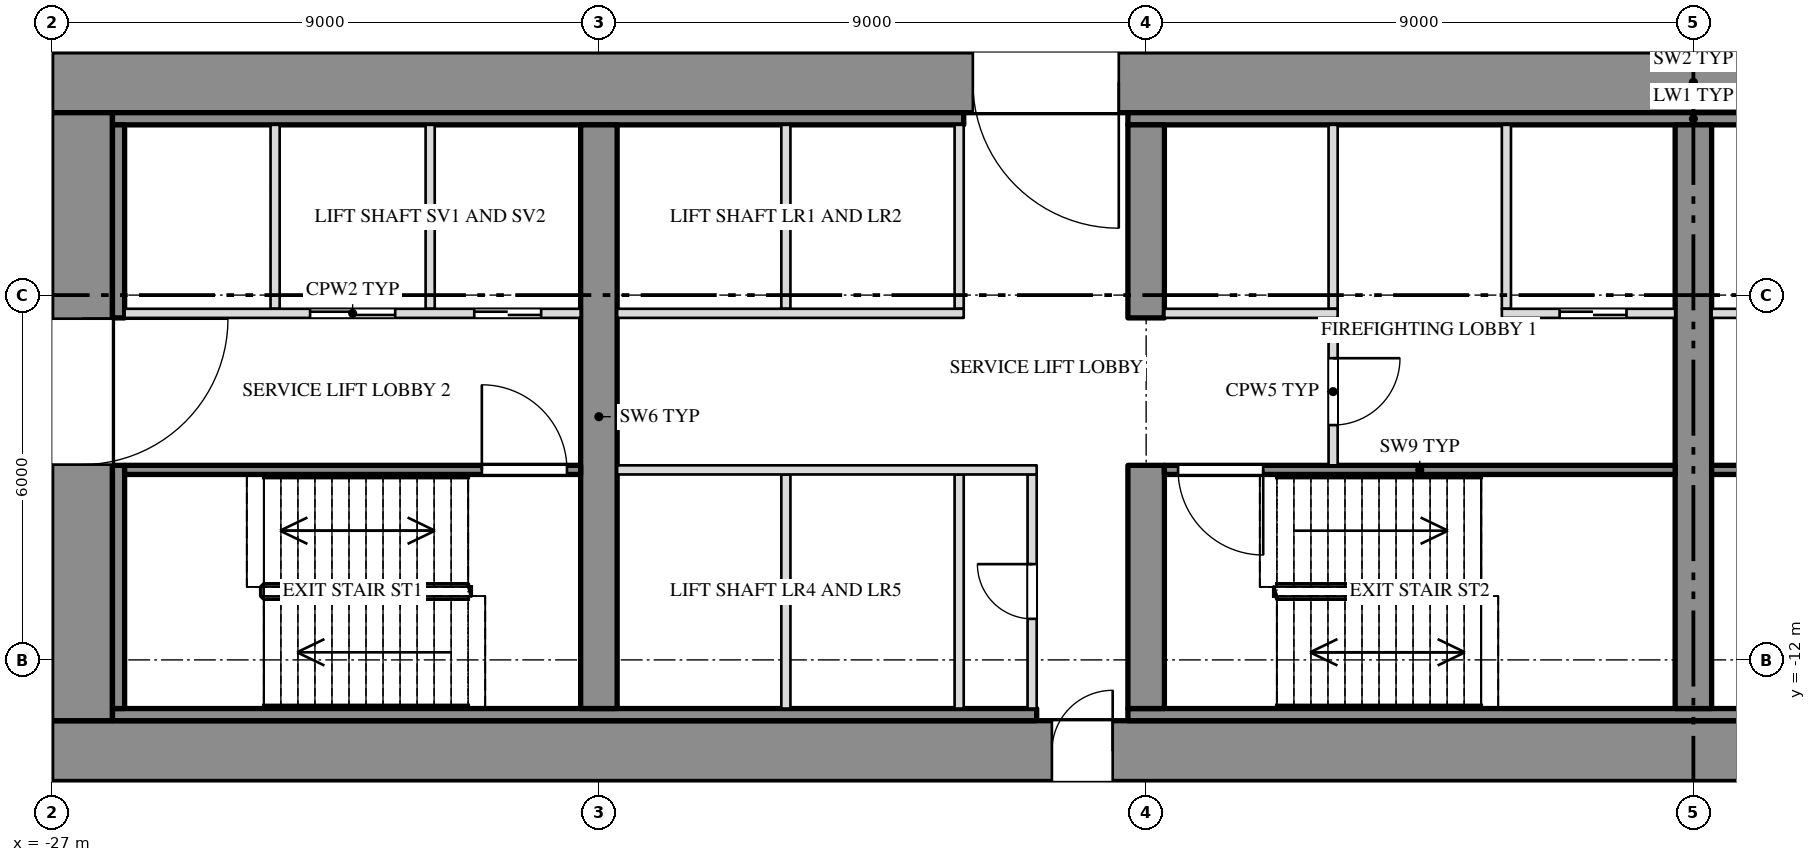
"""IFC4 building model, lengths in metres.
Left out: names, types, materials, properties, quantities, classifications, styles, units other than length and angle.
Written with IfcOpenShell. Run it as: python <this file> out.ifc"""

import sys

from ifc_helpers import new_model, si_unit, direction, frame, frame_2d, origin, place, context, subcontext, project, spatial, rectangle, extrude, element, fill, save


model = new_model("IFC4")
c1 = context("Model", 3, precision=1e-05, world=origin(), true_north=direction((0.0, 1.0)))
c2 = subcontext(c1, "Body", "Model", "MODEL_VIEW")
j1 = project(units=[si_unit("LENGTHUNIT", "METRE"), si_unit("PLANEANGLEUNIT", "RADIAN")], contexts=[c1])
p1 = place(None, origin())
s1 = spatial("IfcSite", under=j1, at=p1, CompositionType="ELEMENT")
p2 = place(p1, origin())
s2 = spatial("IfcBuilding", under=s1, at=p2, CompositionType="ELEMENT")
p3 = place(p2, frame((0.0, 0.0, 104.5)))
s3 = spatial("IfcBuildingStorey", under=s2, at=p3, CompositionType="ELEMENT", Elevation=104.5)
p4 = place(p3, frame((-27.0, -2.5, 0.0), z_axis=(0.0, 0.0, 1.0), x_axis=(1.0, 0.0, 0.0)))
e1 = element("IfcWall", 1, at=p4, inside=s3, PredefinedType="SHEAR", context=c2, shape_type="SweptSolid", body=[
    extrude(rectangle(XDim=54.0, YDim=1.0, at=frame_2d((27.0, 0.0))), origin(), (0.0, 0.0, 1.0), 3.8),
])
p5 = place(p4, frame((15.15, 0.0, 0.0)))
e2 = element("IfcOpeningElement", 2, at=p5, cuts=e1, PredefinedType="OPENING", context=c2, shape_type="SweptSolid", body=[
    extrude(rectangle(XDim=2.4, YDim=2.1, at=frame_2d((1.2, 1.05))), frame((0.0, 0.512, 0.0), z_axis=(0.0, -1.0, 0.0), x_axis=(1.0, 0.0, 0.0)), (0.0, 0.0, 1.0), 1.024),
])
p6 = place(p4, frame((36.45, 0.0, 0.0)))
e3 = element("IfcOpeningElement", 3, at=p6, cuts=e1, PredefinedType="OPENING", context=c2, shape_type="SweptSolid", body=[
    extrude(rectangle(XDim=2.4, YDim=2.1, at=frame_2d((1.2, 1.05))), frame((0.0, 0.512, 0.0), z_axis=(0.0, -1.0, 0.0), x_axis=(1.0, 0.0, 0.0)), (0.0, 0.0, 1.0), 1.024),
])
p7 = place(p3, frame((-27.0, -13.5, 0.0), z_axis=(0.0, 0.0, 1.0), x_axis=(1.0, 0.0, 0.0)))
e4 = element("IfcWall", 4, at=p7, inside=s3, PredefinedType="SHEAR", context=c2, shape_type="SweptSolid", body=[
    extrude(rectangle(XDim=54.0, YDim=1.0, at=frame_2d((27.0, 0.0))), origin(), (0.0, 0.0, 1.0), 3.8),
])
p8 = place(p7, frame((16.45, 0.0, 0.0)))
e5 = element("IfcOpeningElement", 5, at=p8, cuts=e4, PredefinedType="OPENING", context=c2, shape_type="SweptSolid", body=[
    extrude(rectangle(XDim=1.0, YDim=2.1, at=frame_2d((0.5, 1.05))), frame((0.0, 0.512, 0.0), z_axis=(0.0, -1.0, 0.0), x_axis=(1.0, 0.0, 0.0)), (0.0, 0.0, 1.0), 1.024),
])
p9 = place(p7, frame((36.55, 0.0, 0.0)))
e6 = element("IfcOpeningElement", 6, at=p9, cuts=e4, PredefinedType="OPENING", context=c2, shape_type="SweptSolid", body=[
    extrude(rectangle(XDim=1.0, YDim=2.1, at=frame_2d((0.5, 1.05))), frame((0.0, 0.512, 0.0), z_axis=(0.0, -1.0, 0.0), x_axis=(1.0, 0.0, 0.0)), (0.0, 0.0, 1.0), 1.024),
])
p10 = place(p3, frame((-26.5, -13.0, 0.0), z_axis=(0.0, 0.0, 1.0), x_axis=(0.0, 1.0, 0.0)))
e7 = element("IfcWall", 7, at=p10, inside=s3, PredefinedType="SHEAR", context=c2, shape_type="SweptSolid", body=[
    extrude(rectangle(XDim=10.0, YDim=1.0, at=frame_2d((5.0, 0.0))), origin(), (0.0, 0.0, 1.0), 3.8),
])
p11 = place(p10, frame((4.212, 0.0, 0.0)))
e8 = element("IfcOpeningElement", 8, at=p11, cuts=e7, PredefinedType="OPENING", context=c2, shape_type="SweptSolid", body=[
    extrude(rectangle(XDim=2.4, YDim=2.1, at=frame_2d((1.2, 1.05))), frame((0.0, 0.512, 0.0), z_axis=(0.0, -1.0, 0.0), x_axis=(1.0, 0.0, 0.0)), (0.0, 0.0, 1.0), 1.024),
])
p12 = place(p3, frame((-26.0, -3.1, 0.0), z_axis=(0.0, 0.0, 1.0), x_axis=(1.0, 0.0, 0.0)))
e9 = element("IfcWall", 9, at=p12, inside=s3, PredefinedType="SHEAR", context=c2, shape_type="SweptSolid", body=[
    extrude(rectangle(XDim=14.0, YDim=0.2, at=frame_2d((7.0, 0.0))), origin(), (0.0, 0.0, 1.0), 3.8),
])
p13 = place(p3, frame((-9.3, -3.1, 0.0), z_axis=(0.0, 0.0, 1.0), x_axis=(1.0, 0.0, 0.0)))
e10 = element("IfcWall", 10, at=p13, inside=s3, PredefinedType="SHEAR", context=c2, shape_type="SweptSolid", body=[
    extrude(rectangle(XDim=18.6, YDim=0.2, at=frame_2d((9.3, 0.0))), origin(), (0.0, 0.0, 1.0), 3.8),
])
p14 = place(p3, frame((-26.0, -12.9, 0.0), z_axis=(0.0, 0.0, 1.0), x_axis=(1.0, 0.0, 0.0)))
e11 = element("IfcWall", 11, at=p14, inside=s3, PredefinedType="SHEAR", context=c2, shape_type="SweptSolid", body=[
    extrude(rectangle(XDim=15.2, YDim=0.2, at=frame_2d((7.6, 0.0))), origin(), (0.0, 0.0, 1.0), 3.8),
])
p15 = place(p3, frame((-9.3, -12.9, 0.0), z_axis=(0.0, 0.0, 1.0), x_axis=(1.0, 0.0, 0.0)))
e12 = element("IfcWall", 12, at=p15, inside=s3, PredefinedType="SHEAR", context=c2, shape_type="SweptSolid", body=[
    extrude(rectangle(XDim=18.6, YDim=0.2, at=frame_2d((9.3, 0.0))), origin(), (0.0, 0.0, 1.0), 3.8),
])
p16 = place(p3, frame((-25.9, -12.8, 0.0), z_axis=(0.0, 0.0, 1.0), x_axis=(0.0, 1.0, 0.0)))
e13 = element("IfcWall", 13, at=p16, inside=s3, PredefinedType="SHEAR", context=c2, shape_type="SweptSolid", body=[
    extrude(rectangle(XDim=4.0, YDim=0.2, at=frame_2d((2.0, 0.0))), origin(), (0.0, 0.0, 1.0), 3.8),
])
p17 = place(p3, frame((-25.9, -6.375, 0.0), z_axis=(0.0, 0.0, 1.0), x_axis=(0.0, 1.0, 0.0)))
e14 = element("IfcWall", 14, at=p17, inside=s3, PredefinedType="SHEAR", context=c2, shape_type="SweptSolid", body=[
    extrude(rectangle(XDim=3.175, YDim=0.2, at=frame_2d((1.587, 0.0))), origin(), (0.0, 0.0, 1.0), 3.8),
])
p18 = place(p3, frame((-18.0, -12.8, 0.0), z_axis=(0.0, 0.0, 1.0), x_axis=(0.0, 1.0, 0.0)))
e15 = element("IfcWall", 15, at=p18, inside=s3, PredefinedType="SHEAR", context=c2, shape_type="SweptSolid", body=[
    extrude(rectangle(XDim=9.6, YDim=0.6, at=frame_2d((4.8, 0.0))), origin(), (0.0, 0.0, 1.0), 3.8),
])
p19 = place(p3, frame((-9.0, -12.8, 0.0), z_axis=(0.0, 0.0, 1.0), x_axis=(0.0, 1.0, 0.0)))
e16 = element("IfcWall", 16, at=p19, inside=s3, PredefinedType="SHEAR", context=c2, shape_type="SweptSolid", body=[
    extrude(rectangle(XDim=4.0, YDim=0.6, at=frame_2d((2.0, 0.0))), origin(), (0.0, 0.0, 1.0), 3.8),
])
p20 = place(p3, frame((-9.0, -6.375, 0.0), z_axis=(0.0, 0.0, 1.0), x_axis=(0.0, 1.0, 0.0)))
e17 = element("IfcWall", 17, at=p20, inside=s3, PredefinedType="SHEAR", context=c2, shape_type="SweptSolid", body=[
    extrude(rectangle(XDim=3.175, YDim=0.6, at=frame_2d((1.587, 0.0))), origin(), (0.0, 0.0, 1.0), 3.8),
])
p21 = place(p3, frame((0.0, -12.8, 0.0), z_axis=(0.0, 0.0, 1.0), x_axis=(0.0, 1.0, 0.0)))
e18 = element("IfcWall", 18, at=p21, inside=s3, PredefinedType="SHEAR", context=c2, shape_type="SweptSolid", body=[
    extrude(rectangle(XDim=9.6, YDim=0.6, at=frame_2d((4.8, 0.0))), origin(), (0.0, 0.0, 1.0), 3.8),
])
for number, where, z_axis, x_axis in (
    (19, (-20.775, -6.225, 0.0), (0.0, 0.0, 1.0), (0.0, 1.0, 0.0)),
    (20, (-23.325, -6.225, 0.0), (0.0, 0.0, 1.0), (0.0, 1.0, 0.0)),
    (21, (-12.075, -6.225, 0.0), (0.0, 0.0, 1.0), (0.0, 1.0, 0.0)),
    (22, (-14.925, -6.225, 0.0), (0.0, 0.0, 1.0), (0.0, 1.0, 0.0)),
    (23, (-3.075, -6.225, 0.0), (0.0, 0.0, 1.0), (0.0, 1.0, 0.0)),
    (24, (-5.925, -6.225, 0.0), (0.0, 0.0, 1.0), (0.0, 1.0, 0.0)),
):
    element("IfcWall", number, at=place(p3, frame(where, z_axis=z_axis, x_axis=x_axis)), inside=s3, PredefinedType="PARTITIONING", context=c2, shape_type="SweptSolid", body=[
        extrude(rectangle(XDim=3.025, YDim=0.15, at=frame_2d((1.513, 0.0))), origin(), (0.0, 0.0, 1.0), 3.8),
    ])
p22 = place(p3, frame((-10.875, -12.8, 0.0), z_axis=(0.0, 0.0, 1.0), x_axis=(0.0, 1.0, 0.0)))
e25 = element("IfcWall", 25, at=p22, inside=s3, PredefinedType="PARTITIONING", context=c2, shape_type="SweptSolid", body=[
    extrude(rectangle(XDim=3.85, YDim=0.15, at=frame_2d((1.925, 0.0))), origin(), (0.0, 0.0, 1.0), 3.8),
])
p23 = place(p22, frame((1.475, 0.0, 0.0)))
e26 = element("IfcOpeningElement", 26, at=p23, cuts=e25, PredefinedType="OPENING", context=c2, shape_type="SweptSolid", body=[
    extrude(rectangle(XDim=0.9, YDim=2.1, at=frame_2d((0.45, 1.05))), frame((0.0, 0.087, 0.0), z_axis=(0.0, -1.0, 0.0), x_axis=(1.0, 0.0, 0.0)), (0.0, 0.0, 1.0), 0.174),
])
for number, where, z_axis, x_axis in (
    (27, (-12.075, -12.8, 0.0), (0.0, 0.0, 1.0), (0.0, 1.0, 0.0)),
    (28, (-14.925, -12.8, 0.0), (0.0, 0.0, 1.0), (0.0, 1.0, 0.0)),
):
    element("IfcWall", number, at=place(p3, frame(where, z_axis=z_axis, x_axis=x_axis)), inside=s3, PredefinedType="PARTITIONING", context=c2, shape_type="SweptSolid", body=[
        extrude(rectangle(XDim=3.85, YDim=0.15, at=frame_2d((1.925, 0.0))), origin(), (0.0, 0.0, 1.0), 3.8),
    ])
p24 = place(p3, frame((-5.925, -8.8, 0.0), z_axis=(0.0, 0.0, 1.0), x_axis=(0.0, 1.0, 0.0)))
e29 = element("IfcWall", 29, at=p24, inside=s3, PredefinedType="PARTITIONING", context=c2, shape_type="SweptSolid", body=[
    extrude(rectangle(XDim=2.425, YDim=0.15, at=frame_2d((1.212, 0.0))), origin(), (0.0, 0.0, 1.0), 3.8),
])
p25 = place(p24, frame((0.662, 0.0, 0.0)))
e30 = element("IfcOpeningElement", 30, at=p25, cuts=e29, PredefinedType="OPENING", context=c2, shape_type="SweptSolid", body=[
    extrude(rectangle(XDim=1.1, YDim=2.1, at=frame_2d((0.55, 1.05))), frame((0.0, 0.087, 0.0), z_axis=(0.0, -1.0, 0.0), x_axis=(1.0, 0.0, 0.0)), (0.0, 0.0, 1.0), 0.174),
])
p26 = place(p3, frame((-25.8, -6.3, 0.0), z_axis=(0.0, 0.0, 1.0), x_axis=(1.0, 0.0, 0.0)))
e31 = element("IfcWall", 31, at=p26, inside=s3, PredefinedType="PARTITIONING", context=c2, shape_type="SweptSolid", body=[
    extrude(rectangle(XDim=7.5, YDim=0.15, at=frame_2d((3.75, 0.0))), origin(), (0.0, 0.0, 1.0), 3.8),
])
p27 = place(p26, frame((3.05, 0.0, 0.0)))
e32 = element("IfcOpeningElement", 32, at=p27, cuts=e31, PredefinedType="OPENING", context=c2, shape_type="SweptSolid", body=[
    extrude(rectangle(XDim=1.4, YDim=2.1, at=frame_2d((0.7, 1.05))), frame((0.0, 0.087, 0.0), z_axis=(0.0, -1.0, 0.0), x_axis=(1.0, 0.0, 0.0)), (0.0, 0.0, 1.0), 0.174),
])
p28 = place(p26, frame((5.75, 0.0, 0.0)))
e33 = element("IfcOpeningElement", 33, at=p28, cuts=e31, PredefinedType="OPENING", context=c2, shape_type="SweptSolid", body=[
    extrude(rectangle(XDim=1.1, YDim=2.1, at=frame_2d((0.55, 1.05))), frame((0.0, 0.087, 0.0), z_axis=(0.0, -1.0, 0.0), x_axis=(1.0, 0.0, 0.0)), (0.0, 0.0, 1.0), 0.174),
])
p29 = place(p3, frame((-17.7, -6.3, 0.0), z_axis=(0.0, 0.0, 1.0), x_axis=(1.0, 0.0, 0.0)))
e34 = element("IfcWall", 34, at=p29, inside=s3, PredefinedType="PARTITIONING", context=c2, shape_type="SweptSolid", body=[
    extrude(rectangle(XDim=5.7, YDim=0.15, at=frame_2d((2.85, 0.0))), origin(), (0.0, 0.0, 1.0), 3.8),
])
p30 = place(p3, frame((-8.7, -6.3, 0.0), z_axis=(0.0, 0.0, 1.0), x_axis=(1.0, 0.0, 0.0)))
e35 = element("IfcWall", 35, at=p30, inside=s3, PredefinedType="PARTITIONING", context=c2, shape_type="SweptSolid", body=[
    extrude(rectangle(XDim=2.85, YDim=0.15, at=frame_2d((1.425, 0.0))), origin(), (0.0, 0.0, 1.0), 3.8),
])
p31 = place(p3, frame((-3.15, -6.3, 0.0), z_axis=(0.0, 0.0, 1.0), x_axis=(1.0, 0.0, 0.0)))
e36 = element("IfcWall", 36, at=p31, inside=s3, PredefinedType="PARTITIONING", context=c2, shape_type="SweptSolid", body=[
    extrude(rectangle(XDim=2.85, YDim=0.15, at=frame_2d((1.425, 0.0))), origin(), (0.0, 0.0, 1.0), 3.8),
])
p32 = place(p31, frame((0.95, 0.0, 0.0)))
e37 = element("IfcOpeningElement", 37, at=p32, cuts=e36, PredefinedType="OPENING", context=c2, shape_type="SweptSolid", body=[
    extrude(rectangle(XDim=1.1, YDim=2.1, at=frame_2d((0.55, 1.05))), frame((0.0, 0.087, 0.0), z_axis=(0.0, -1.0, 0.0), x_axis=(1.0, 0.0, 0.0)), (0.0, 0.0, 1.0), 0.174),
])
p33 = place(p3, frame((0.3, -6.3, 0.0), z_axis=(0.0, 0.0, 1.0), x_axis=(1.0, 0.0, 0.0)))
e38 = element("IfcWall", 38, at=p33, inside=s3, PredefinedType="PARTITIONING", context=c2, shape_type="SweptSolid", body=[
    extrude(rectangle(XDim=2.85, YDim=0.15, at=frame_2d((1.425, 0.0))), origin(), (0.0, 0.0, 1.0), 3.8),
])
p34 = place(p33, frame((0.8, 0.0, 0.0)))
e39 = element("IfcOpeningElement", 39, at=p34, cuts=e38, PredefinedType="OPENING", context=c2, shape_type="SweptSolid", body=[
    extrude(rectangle(XDim=1.1, YDim=2.1, at=frame_2d((0.55, 1.05))), frame((0.0, 0.087, 0.0), z_axis=(0.0, -1.0, 0.0), x_axis=(1.0, 0.0, 0.0)), (0.0, 0.0, 1.0), 0.174),
])
p35 = place(p3, frame((-25.8, -8.875, 0.0), z_axis=(0.0, 0.0, 1.0), x_axis=(1.0, 0.0, 0.0)))
e40 = element("IfcWall", 40, at=p35, inside=s3, PredefinedType="SHEAR", context=c2, shape_type="SweptSolid", body=[
    extrude(rectangle(XDim=7.5, YDim=0.15, at=frame_2d((3.75, 0.0))), origin(), (0.0, 0.0, 1.0), 3.8),
])
p36 = place(p35, frame((5.875, 0.0, 0.0)))
e41 = element("IfcOpeningElement", 41, at=p36, cuts=e40, PredefinedType="OPENING", context=c2, shape_type="SweptSolid", body=[
    extrude(rectangle(XDim=1.4, YDim=2.1, at=frame_2d((0.7, 1.05))), frame((0.0, 0.087, 0.0), z_axis=(0.0, -1.0, 0.0), x_axis=(1.0, 0.0, 0.0)), (0.0, 0.0, 1.0), 0.174),
])
p37 = place(p3, frame((-17.7, -8.875, 0.0), z_axis=(0.0, 0.0, 1.0), x_axis=(1.0, 0.0, 0.0)))
e42 = element("IfcWall", 42, at=p37, inside=s3, PredefinedType="PARTITIONING", context=c2, shape_type="SweptSolid", body=[
    extrude(rectangle(XDim=6.9, YDim=0.15, at=frame_2d((3.45, 0.0))), origin(), (0.0, 0.0, 1.0), 3.8),
])
p38 = place(p3, frame((-8.7, -8.875, 0.0), z_axis=(0.0, 0.0, 1.0), x_axis=(1.0, 0.0, 0.0)))
e43 = element("IfcWall", 43, at=p38, inside=s3, PredefinedType="SHEAR", context=c2, shape_type="SweptSolid", body=[
    extrude(rectangle(XDim=8.4, YDim=0.15, at=frame_2d((4.2, 0.0))), origin(), (0.0, 0.0, 1.0), 3.8),
])
p39 = place(p38, frame((0.225, 0.0, 0.0)))
e44 = element("IfcOpeningElement", 44, at=p39, cuts=e43, PredefinedType="OPENING", context=c2, shape_type="SweptSolid", body=[
    extrude(rectangle(XDim=1.4, YDim=2.1, at=frame_2d((0.7, 1.05))), frame((0.0, 0.087, 0.0), z_axis=(0.0, -1.0, 0.0), x_axis=(1.0, 0.0, 0.0)), (0.0, 0.0, 1.0), 0.174),
])
p40 = place(p3, frame((0.3, -8.875, 0.0), z_axis=(0.0, 0.0, 1.0), x_axis=(1.0, 0.0, 0.0)))
e45 = element("IfcWall", 45, at=p40, inside=s3, PredefinedType="SHEAR", context=c2, shape_type="SweptSolid", body=[
    extrude(rectangle(XDim=8.4, YDim=0.15, at=frame_2d((4.2, 0.0))), origin(), (0.0, 0.0, 1.0), 3.8),
])
p41 = place(p40, frame((6.775, 0.0, 0.0)))
e46 = element("IfcOpeningElement", 46, at=p41, cuts=e45, PredefinedType="OPENING", context=c2, shape_type="SweptSolid", body=[
    extrude(rectangle(XDim=1.4, YDim=2.1, at=frame_2d((0.7, 1.05))), frame((0.0, 0.087, 0.0), z_axis=(0.0, -1.0, 0.0), x_axis=(1.0, 0.0, 0.0)), (0.0, 0.0, 1.0), 0.174),
])
p42 = place(p11, origin())
e47 = element("IfcDoor", 47, at=p42, inside=s3, OperationType="DOUBLE_DOOR_SINGLE_SWING", PredefinedType="DOOR", context=c2, shape_type="SweptSolid", body=[
    extrude(rectangle(XDim=2.4, YDim=2.1, at=frame_2d((1.2, 1.05))), frame((0.0, 0.025, 0.0), z_axis=(0.0, -1.0, 0.0), x_axis=(1.0, 0.0, 0.0)), (0.0, 0.0, 1.0), 0.05),
])
fill(e8, e47)
p43 = place(p27, origin())
e48 = element("IfcDoor", 48, at=p43, inside=s3, OperationType="SLIDING_TO_RIGHT", PredefinedType="DOOR", context=c2, shape_type="SweptSolid", body=[
    extrude(rectangle(XDim=1.4, YDim=2.1, at=frame_2d((0.7, 1.05))), frame((0.0, 0.025, 0.0), z_axis=(0.0, -1.0, 0.0), x_axis=(1.0, 0.0, 0.0)), (0.0, 0.0, 1.0), 0.05),
])
fill(e32, e48)
p44 = place(p28, origin())
e49 = element("IfcDoor", 49, at=p44, inside=s3, OperationType="SLIDING_TO_LEFT", PredefinedType="DOOR", context=c2, shape_type="SweptSolid", body=[
    extrude(rectangle(XDim=1.1, YDim=2.1, at=frame_2d((0.55, 1.05))), frame((0.0, 0.025, 0.0), z_axis=(0.0, -1.0, 0.0), x_axis=(1.0, 0.0, 0.0)), (0.0, 0.0, 1.0), 0.05),
])
fill(e33, e49)
p45 = place(p36, origin())
e50 = element("IfcDoor", 50, at=p45, inside=s3, OperationType="DOUBLE_DOOR_SINGLE_SWING", PredefinedType="DOOR", context=c2, shape_type="SweptSolid", body=[
    extrude(rectangle(XDim=1.4, YDim=2.1, at=frame_2d((0.7, 1.05))), frame((0.0, 0.025, 0.0), z_axis=(0.0, -1.0, 0.0), x_axis=(1.0, 0.0, 0.0)), (0.0, 0.0, 1.0), 0.05),
])
fill(e41, e50)
p46 = place(p23, origin())
e51 = element("IfcDoor", 51, at=p46, inside=s3, OperationType="SINGLE_SWING_RIGHT", PredefinedType="DOOR", context=c2, shape_type="SweptSolid", body=[
    extrude(rectangle(XDim=0.9, YDim=2.1, at=frame_2d((0.45, 1.05))), frame((0.0, 0.025, 0.0), z_axis=(0.0, -1.0, 0.0), x_axis=(1.0, 0.0, 0.0)), (0.0, 0.0, 1.0), 0.05),
])
fill(e26, e51)
p47 = place(p5, origin())
e52 = element("IfcDoor", 52, at=p47, inside=s3, OperationType="DOUBLE_DOOR_SINGLE_SWING", PredefinedType="DOOR", context=c2, shape_type="SweptSolid", body=[
    extrude(rectangle(XDim=2.4, YDim=2.1, at=frame_2d((1.2, 1.05))), frame((0.0, 0.025, 0.0), z_axis=(0.0, -1.0, 0.0), x_axis=(1.0, 0.0, 0.0)), (0.0, 0.0, 1.0), 0.05),
])
fill(e2, e52)
p48 = place(p8, origin())
e53 = element("IfcDoor", 53, at=p48, inside=s3, OperationType="SINGLE_SWING_RIGHT", PredefinedType="DOOR", context=c2, shape_type="SweptSolid", body=[
    extrude(rectangle(XDim=1.0, YDim=2.1, at=frame_2d((0.5, 1.05))), frame((0.0, 0.025, 0.0), z_axis=(0.0, -1.0, 0.0), x_axis=(1.0, 0.0, 0.0)), (0.0, 0.0, 1.0), 0.05),
])
fill(e5, e53)
p49 = place(p39, origin())
e54 = element("IfcDoor", 54, at=p49, inside=s3, OperationType="DOUBLE_DOOR_SINGLE_SWING", PredefinedType="DOOR", context=c2, shape_type="SweptSolid", body=[
    extrude(rectangle(XDim=1.4, YDim=2.1, at=frame_2d((0.7, 1.05))), frame((0.0, 0.025, 0.0), z_axis=(0.0, -1.0, 0.0), x_axis=(1.0, 0.0, 0.0)), (0.0, 0.0, 1.0), 0.05),
])
fill(e44, e54)
p50 = place(p25, origin())
e55 = element("IfcDoor", 55, at=p50, inside=s3, OperationType="SINGLE_SWING_LEFT", PredefinedType="DOOR", context=c2, shape_type="SweptSolid", body=[
    extrude(rectangle(XDim=1.1, YDim=2.1, at=frame_2d((0.55, 1.05))), frame((0.0, 0.025, 0.0), z_axis=(0.0, -1.0, 0.0), x_axis=(1.0, 0.0, 0.0)), (0.0, 0.0, 1.0), 0.05),
])
fill(e30, e55)
p51 = place(p32, origin())
e56 = element("IfcDoor", 56, at=p51, inside=s3, OperationType="SLIDING_TO_RIGHT", PredefinedType="DOOR", context=c2, shape_type="SweptSolid", body=[
    extrude(rectangle(XDim=1.1, YDim=2.1, at=frame_2d((0.55, 1.05))), frame((0.0, 0.025, 0.0), z_axis=(0.0, -1.0, 0.0), x_axis=(1.0, 0.0, 0.0)), (0.0, 0.0, 1.0), 0.05),
])
fill(e37, e56)
save(model, sys.argv[1])
